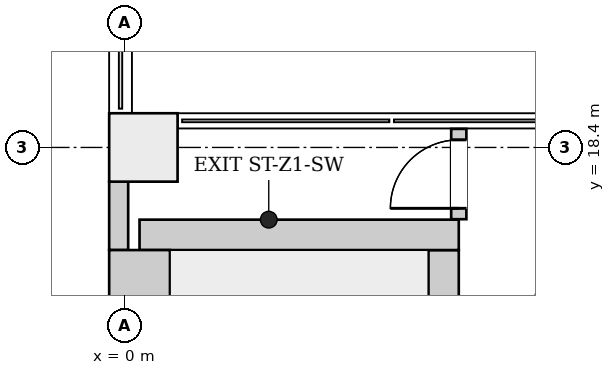
"""IFC4 building model, lengths in metres.
Left out: names, types, materials, properties, quantities, classifications, styles, units other than length and angle.
Written with IfcOpenShell. Run it as: python <this file> out.ifc"""

import sys

from ifc_helpers import new_model, si_unit, direction, frame, frame_2d, origin, origin_2d, place, context, subcontext, project, spatial, rectangle, extrude, element, fill, save


model = new_model("IFC4")
c1 = context("Model", 3, precision=1e-05, world=origin(), true_north=direction((0.0, 1.0)))
c2 = subcontext(c1, "Body", "Model", "MODEL_VIEW")
j1 = project(units=[si_unit("LENGTHUNIT", "METRE"), si_unit("PLANEANGLEUNIT", "RADIAN")], contexts=[c1])
p1 = place(None, origin())
s1 = spatial("IfcSite", under=j1, at=p1, CompositionType="ELEMENT")
p2 = place(p1, origin())
s2 = spatial("IfcBuilding", under=s1, at=p2, CompositionType="ELEMENT")
p3 = place(p2, frame((0.0, 0.0, 52.9)))
s3 = spatial("IfcBuildingStorey", under=s2, at=p3, CompositionType="ELEMENT", Elevation=52.9)
p4 = place(p3, frame((0.2, 17.25, 0.0), z_axis=(0.0, 0.0, 1.0), x_axis=(1.0, 0.0, 0.0)))
e1 = element("IfcWall", 1, at=p4, inside=s3, PredefinedType="SHEAR", context=c2, shape_type="SweptSolid", body=[
    extrude(rectangle(XDim=4.2, YDim=0.4, at=frame_2d((2.1, 0.0))), origin(), (0.0, 0.0, 1.0), 4.2),
])
p5 = place(p3, frame((0.2, 10.45, 0.0), z_axis=(0.0, 0.0, 1.0), x_axis=(0.0, 1.0, 0.0)))
e2 = element("IfcWall", 2, at=p5, inside=s3, PredefinedType="SHEAR", context=c2, shape_type="SweptSolid", body=[
    extrude(rectangle(XDim=6.6, YDim=0.8, at=frame_2d((3.3, 0.0))), origin(), (0.0, 0.0, 1.0), 4.2),
])
p6 = place(p3, frame((4.2, 10.45, 0.0), z_axis=(0.0, 0.0, 1.0), x_axis=(0.0, 1.0, 0.0)))
e3 = element("IfcWall", 3, at=p6, inside=s3, PredefinedType="SHEAR", context=c2, shape_type="SweptSolid", body=[
    extrude(rectangle(XDim=6.6, YDim=0.4, at=frame_2d((3.3, 0.0))), origin(), (0.0, 0.0, 1.0), 4.2),
])
p7 = place(p6, frame((0.21, 0.0, 0.0)))
e4 = element("IfcOpeningElement", 4, at=p7, cuts=e3, PredefinedType="OPENING", context=c2, shape_type="SweptSolid", body=[
    extrude(rectangle(XDim=1.2, YDim=2.1, at=frame_2d((0.6, 1.05))), frame((0.0, 0.21, 0.0), z_axis=(0.0, -1.0, 0.0), x_axis=(1.0, 0.0, 0.0)), (0.0, 0.0, 1.0), 0.42),
])
p8 = place(p3, frame((0.25, 18.4, 0.0), z_axis=(0.0, 0.0, 1.0), x_axis=(1.0, 0.0, 0.0)))
e5 = element("IfcColumn", 5, at=p8, inside=s3, PredefinedType="COLUMN", context=c2, shape_type="SweptSolid", body=[
    extrude(rectangle(XDim=0.9, YDim=0.9, at=origin_2d()), origin(), (0.0, 0.0, 1.0), 4.2),
])
p9 = place(p3, frame((-0.074, 17.95, 0.0), z_axis=(0.0, 0.0, 1.0), x_axis=(0.0, -1.0, 0.0)))
e6 = element("IfcWall", 6, at=p9, inside=s3, PredefinedType="ELEMENTEDWALL", context=c2, shape_type="SweptSolid", body=[
    extrude(rectangle(XDim=0.9, YDim=0.25, at=frame_2d((0.45, 0.0))), origin(), (0.0, 0.0, 1.0), 3.9),
])
p10 = place(p3, frame((4.4, 17.456, 0.0), z_axis=(0.0, 0.0, 1.0), x_axis=(0.0, 1.0, 0.0)))
e7 = element("IfcWall", 7, at=p10, inside=s3, PredefinedType="PARTITIONING", context=c2, shape_type="SweptSolid", body=[
    extrude(rectangle(XDim=1.188, YDim=0.2, at=frame_2d((0.594, 0.0))), origin(), (0.0, 0.0, 1.0), 3.9),
])
p11 = place(p10, frame((0.144, 0.0, 0.0)))
e8 = element("IfcOpeningElement", 8, at=p11, cuts=e7, PredefinedType="OPENING", context=c2, shape_type="SweptSolid", body=[
    extrude(rectangle(XDim=0.9, YDim=2.1, at=frame_2d((0.45, 1.05))), frame((0.0, 0.11, 0.0), z_axis=(0.0, -1.0, 0.0), x_axis=(1.0, 0.0, 0.0)), (0.0, 0.0, 1.0), 0.22),
])
p12 = place(p11, origin())
e9 = element("IfcDoor", 9, at=p12, inside=s3, OperationType="SINGLE_SWING_LEFT", PredefinedType="DOOR", context=c2, shape_type="SweptSolid", body=[
    extrude(rectangle(XDim=0.9, YDim=2.1, at=frame_2d((0.45, 1.05))), frame((0.0, 0.025, 0.0), z_axis=(0.0, -1.0, 0.0), x_axis=(1.0, 0.0, 0.0)), (0.0, 0.0, 1.0), 0.05),
])
fill(e8, e9)
save(model, sys.argv[1])
